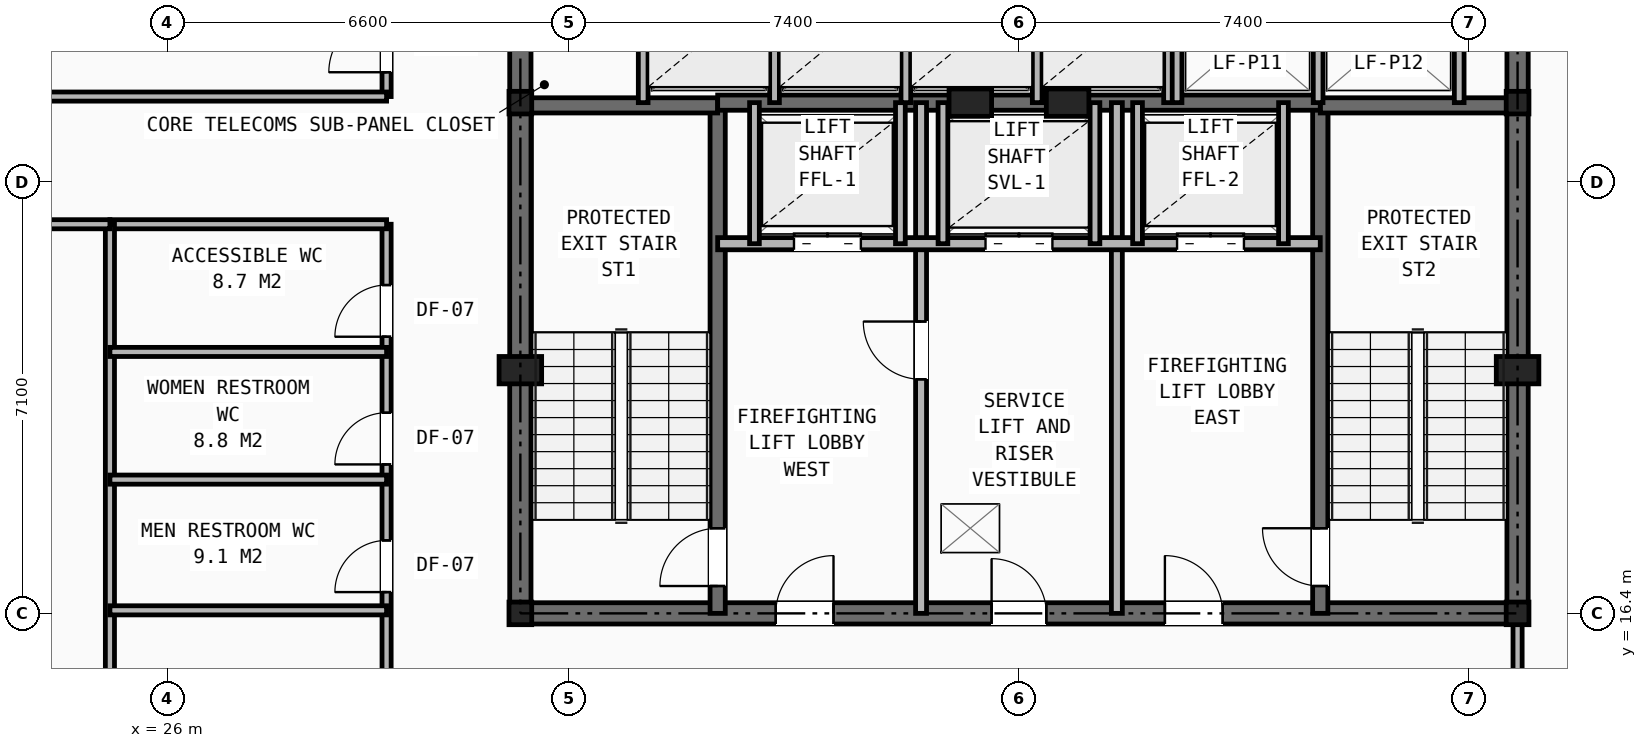
"""IFC4 building model, lengths in metres.
Left out: names, types, materials, properties, quantities, classifications, styles, units other than length and angle.
Written with IfcOpenShell. Run it as: python <this file> out.ifc"""

import sys

from ifc_helpers import new_model, si_unit, direction, frame, frame_2d, origin, origin_2d, place, context, subcontext, project, spatial, rectangle, i_section, extrude, element, fill, save


model = new_model("IFC4")
c1 = context("Model", 3, precision=1e-05, world=origin(), true_north=direction((0.0, 1.0)))
c2 = subcontext(c1, "Body", "Model", "MODEL_VIEW")
j1 = project(units=[si_unit("LENGTHUNIT", "METRE"), si_unit("PLANEANGLEUNIT", "RADIAN")], contexts=[c1])
p1 = place(None, origin())
s1 = spatial("IfcSite", under=j1, at=p1, CompositionType="ELEMENT")
p2 = place(p1, origin())
s2 = spatial("IfcBuilding", under=s1, at=p2, CompositionType="ELEMENT")
p3 = place(p2, frame((0.0, 0.0, 111.8)))
s3 = spatial("IfcBuildingStorey", under=s2, at=p3, CompositionType="ELEMENT", Elevation=111.8)
for number, where, z_axis, x_axis in (
    (1, (31.8, 16.4, 0.0), (0.0, 0.0, 1.0), (1.0, 0.0, 0.0)),
    (2, (48.2, 16.4, 0.0), (0.0, 0.0, 1.0), (1.0, 0.0, 0.0)),
    (3, (31.8, 24.8, 0.0), (0.0, 0.0, 1.0), (1.0, 0.0, 0.0)),
    (4, (48.2, 24.8, 0.0), (0.0, 0.0, 1.0), (1.0, 0.0, 0.0)),
):
    element("IfcColumn", number, at=place(p3, frame(where, z_axis=z_axis, x_axis=x_axis)), inside=s3, PredefinedType="COLUMN", context=c2, shape_type="SweptSolid", body=[
        extrude(i_section(OverallWidth=0.374, OverallDepth=0.372, WebThickness=0.016, FlangeThickness=0.026, at=origin_2d()), origin(), (0.0, 0.0, 1.0), 4.2),
    ])
for number, where, z_axis, x_axis in (
    (5, (31.8, 20.4, 0.0), (0.0, 0.0, 1.0), (1.0, 0.0, 0.0)),
    (6, (48.2, 20.4, 0.0), (0.0, 0.0, 1.0), (1.0, 0.0, 0.0)),
    (7, (39.2, 24.8, 0.0), (0.0, 0.0, 1.0), (1.0, 0.0, 0.0)),
    (8, (40.8, 24.8, 0.0), (0.0, 0.0, 1.0), (1.0, 0.0, 0.0)),
):
    element("IfcColumn", number, at=place(p3, frame(where, z_axis=z_axis, x_axis=x_axis)), inside=s3, PredefinedType="PILASTER", context=c2, shape_type="SweptSolid", body=[
        extrude(rectangle(XDim=0.7, YDim=0.45, at=origin_2d()), origin(), (0.0, 0.0, 1.0), 4.2),
    ])
p4 = place(p3, frame((31.8, 16.4, 0.0), z_axis=(0.0, 0.0, 1.0), x_axis=(1.0, 0.0, 0.0)))
e9 = element("IfcWall", 9, at=p4, inside=s3, PredefinedType="SHEAR", context=c2, shape_type="SweptSolid", body=[
    extrude(rectangle(XDim=16.4, YDim=0.35, at=frame_2d((8.2, 0.0))), origin(), (0.0, 0.0, 1.0), 3.96),
])
p5 = place(p4, frame((7.75, 0.0, 0.0)))
e10 = element("IfcOpeningElement", 10, at=p5, cuts=e9, PredefinedType="OPENING", context=c2, shape_type="SweptSolid", body=[
    extrude(rectangle(XDim=0.9, YDim=2.1, at=frame_2d((0.45, 1.05))), frame((0.0, 0.185, 0.0), z_axis=(0.0, -1.0, 0.0), x_axis=(1.0, 0.0, 0.0)), (0.0, 0.0, 1.0), 0.37),
])
p6 = place(p4, frame((4.2, 0.0, 0.0)))
e11 = element("IfcOpeningElement", 11, at=p6, cuts=e9, PredefinedType="OPENING", context=c2, shape_type="SweptSolid", body=[
    extrude(rectangle(XDim=0.95, YDim=2.1, at=frame_2d((0.475, 1.05))), frame((0.0, 0.185, 0.0), z_axis=(0.0, -1.0, 0.0), x_axis=(1.0, 0.0, 0.0)), (0.0, 0.0, 1.0), 0.37),
])
p7 = place(p4, frame((10.6, 0.0, 0.0)))
e12 = element("IfcOpeningElement", 12, at=p7, cuts=e9, PredefinedType="OPENING", context=c2, shape_type="SweptSolid", body=[
    extrude(rectangle(XDim=0.95, YDim=2.1, at=frame_2d((0.475, 1.05))), frame((0.0, 0.185, 0.0), z_axis=(0.0, -1.0, 0.0), x_axis=(1.0, 0.0, 0.0)), (0.0, 0.0, 1.0), 0.37),
])
p8 = place(p3, frame((31.8, 16.4, 0.0), z_axis=(0.0, 0.0, 1.0), x_axis=(0.0, 1.0, 0.0)))
e13 = element("IfcWall", 13, at=p8, inside=s3, PredefinedType="SHEAR", context=c2, shape_type="SweptSolid", body=[
    extrude(rectangle(XDim=14.8, YDim=0.35, at=frame_2d((7.4, 0.0))), origin(), (0.0, 0.0, 1.0), 3.96),
])
p9 = place(p8, frame((11.0, 0.0, 0.0)))
e14 = element("IfcOpeningElement", 14, at=p9, cuts=e13, PredefinedType="OPENING", context=c2, shape_type="SweptSolid", body=[
    extrude(rectangle(XDim=1.1, YDim=2.15, at=frame_2d((0.55, 1.075))), frame((0.0, 0.185, 0.0), z_axis=(0.0, -1.0, 0.0), x_axis=(1.0, 0.0, 0.0)), (0.0, 0.0, 1.0), 0.37),
])
p10 = place(p3, frame((48.2, 16.4, 0.0), z_axis=(0.0, 0.0, 1.0), x_axis=(0.0, 1.0, 0.0)))
e15 = element("IfcWall", 15, at=p10, inside=s3, PredefinedType="SHEAR", context=c2, shape_type="SweptSolid", body=[
    extrude(rectangle(XDim=14.8, YDim=0.35, at=frame_2d((7.4, 0.0))), origin(), (0.0, 0.0, 1.0), 3.96),
])
p11 = place(p10, frame((11.0, 0.0, 0.0)))
e16 = element("IfcOpeningElement", 16, at=p11, cuts=e15, PredefinedType="OPENING", context=c2, shape_type="SweptSolid", body=[
    extrude(rectangle(XDim=1.1, YDim=2.15, at=frame_2d((0.55, 1.075))), frame((0.0, 0.185, 0.0), z_axis=(0.0, -1.0, 0.0), x_axis=(1.0, 0.0, 0.0)), (0.0, 0.0, 1.0), 0.37),
])
p12 = place(p3, frame((35.045, 16.4, 0.0), z_axis=(0.0, 0.0, 1.0), x_axis=(0.0, 1.0, 0.0)))
e17 = element("IfcWall", 17, at=p12, inside=s3, PredefinedType="SHEAR", context=c2, shape_type="SweptSolid", body=[
    extrude(rectangle(XDim=8.4, YDim=0.25, at=frame_2d((4.2, 0.0))), origin(), (0.0, 0.0, 1.0), 3.96),
])
p13 = place(p12, frame((0.45, 0.0, 0.0)))
e18 = element("IfcOpeningElement", 18, at=p13, cuts=e17, PredefinedType="OPENING", context=c2, shape_type="SweptSolid", body=[
    extrude(rectangle(XDim=0.95, YDim=2.1, at=frame_2d((0.475, 1.05))), frame((0.0, 0.135, 0.0), z_axis=(0.0, -1.0, 0.0), x_axis=(1.0, 0.0, 0.0)), (0.0, 0.0, 1.0), 0.27),
])
p14 = place(p3, frame((31.8, 24.755, 0.0), z_axis=(0.0, 0.0, 1.0), x_axis=(1.0, 0.0, 0.0)))
e19 = element("IfcWall", 19, at=p14, inside=s3, PredefinedType="SHEAR", context=c2, shape_type="SweptSolid", body=[
    extrude(rectangle(XDim=3.245, YDim=0.25, at=frame_2d((1.623, 0.0))), origin(), (0.0, 0.0, 1.0), 3.96),
])
p15 = place(p3, frame((44.955, 16.4, 0.0), z_axis=(0.0, 0.0, 1.0), x_axis=(0.0, 1.0, 0.0)))
e20 = element("IfcWall", 20, at=p15, inside=s3, PredefinedType="SHEAR", context=c2, shape_type="SweptSolid", body=[
    extrude(rectangle(XDim=8.4, YDim=0.25, at=frame_2d((4.2, 0.0))), origin(), (0.0, 0.0, 1.0), 3.96),
])
p16 = place(p15, frame((0.45, 0.0, 0.0)))
e21 = element("IfcOpeningElement", 21, at=p16, cuts=e20, PredefinedType="OPENING", context=c2, shape_type="SweptSolid", body=[
    extrude(rectangle(XDim=0.95, YDim=2.1, at=frame_2d((0.475, 1.05))), frame((0.0, 0.135, 0.0), z_axis=(0.0, -1.0, 0.0), x_axis=(1.0, 0.0, 0.0)), (0.0, 0.0, 1.0), 0.27),
])
p17 = place(p3, frame((44.955, 24.755, 0.0), z_axis=(0.0, 0.0, 1.0), x_axis=(1.0, 0.0, 0.0)))
e22 = element("IfcWall", 22, at=p17, inside=s3, PredefinedType="SHEAR", context=c2, shape_type="SweptSolid", body=[
    extrude(rectangle(XDim=3.245, YDim=0.25, at=frame_2d((1.623, 0.0))), origin(), (0.0, 0.0, 1.0), 3.96),
])
p18 = place(p3, frame((35.045, 24.8, 0.0), z_axis=(0.0, 0.0, 1.0), x_axis=(1.0, 0.0, 0.0)))
e23 = element("IfcWall", 23, at=p18, inside=s3, PredefinedType="SHEAR", context=c2, shape_type="SweptSolid", body=[
    extrude(rectangle(XDim=9.91, YDim=0.25, at=frame_2d((4.955, 0.0))), origin(), (0.0, 0.0, 1.0), 3.96),
])
p19 = place(p3, frame((38.39, 16.4, 0.0), z_axis=(0.0, 0.0, 1.0), x_axis=(0.0, 1.0, 0.0)))
e24 = element("IfcWall", 24, at=p19, inside=s3, PredefinedType="PARTITIONING", context=c2, shape_type="SweptSolid", body=[
    extrude(rectangle(XDim=8.4, YDim=0.18, at=frame_2d((4.2, 0.0))), origin(), (0.0, 0.0, 1.0), 3.411),
])
p20 = place(p19, frame((3.85, 0.0, 0.0)))
e25 = element("IfcOpeningElement", 25, at=p20, cuts=e24, PredefinedType="OPENING", context=c2, shape_type="SweptSolid", body=[
    extrude(rectangle(XDim=0.95, YDim=2.1, at=frame_2d((0.475, 1.05))), frame((0.0, 0.1, 0.0), z_axis=(0.0, -1.0, 0.0), x_axis=(1.0, 0.0, 0.0)), (0.0, 0.0, 1.0), 0.2),
])
p21 = place(p3, frame((41.61, 16.4, 0.0), z_axis=(0.0, 0.0, 1.0), x_axis=(0.0, 1.0, 0.0)))
e26 = element("IfcWall", 26, at=p21, inside=s3, PredefinedType="PARTITIONING", context=c2, shape_type="SweptSolid", body=[
    extrude(rectangle(XDim=8.4, YDim=0.18, at=frame_2d((4.2, 0.0))), origin(), (0.0, 0.0, 1.0), 3.411),
])
p22 = place(p3, frame((35.045, 22.48, 0.0), z_axis=(0.0, 0.0, 1.0), x_axis=(1.0, 0.0, 0.0)))
e27 = element("IfcWall", 27, at=p22, inside=s3, PredefinedType="SOLIDWALL", context=c2, shape_type="SweptSolid", body=[
    extrude(rectangle(XDim=9.91, YDim=0.2, at=frame_2d((4.955, 0.0))), origin(), (0.0, 0.0, 1.0), 3.96),
])
p23 = place(p22, frame((1.255, 0.0, 0.0)))
e28 = element("IfcOpeningElement", 28, at=p23, cuts=e27, PredefinedType="OPENING", context=c2, shape_type="SweptSolid", body=[
    extrude(rectangle(XDim=1.1, YDim=2.15, at=frame_2d((0.55, 1.075))), frame((0.0, 0.11, 0.0), z_axis=(0.0, -1.0, 0.0), x_axis=(1.0, 0.0, 0.0)), (0.0, 0.0, 1.0), 0.22),
])
p24 = place(p22, frame((7.555, 0.0, 0.0)))
e29 = element("IfcOpeningElement", 29, at=p24, cuts=e27, PredefinedType="OPENING", context=c2, shape_type="SweptSolid", body=[
    extrude(rectangle(XDim=1.1, YDim=2.15, at=frame_2d((0.55, 1.075))), frame((0.0, 0.11, 0.0), z_axis=(0.0, -1.0, 0.0), x_axis=(1.0, 0.0, 0.0)), (0.0, 0.0, 1.0), 0.22),
])
p25 = place(p22, frame((4.405, 0.0, 0.0)))
e30 = element("IfcOpeningElement", 30, at=p25, cuts=e27, PredefinedType="OPENING", context=c2, shape_type="SweptSolid", body=[
    extrude(rectangle(XDim=1.1, YDim=2.15, at=frame_2d((0.55, 1.075))), frame((0.0, 0.11, 0.0), z_axis=(0.0, -1.0, 0.0), x_axis=(1.0, 0.0, 0.0)), (0.0, 0.0, 1.0), 0.22),
])
for number, where, z_axis, x_axis in (
    (31, (35.65, 22.48, 0.0), (0.0, 0.0, 1.0), (0.0, 1.0, 0.0)),
    (32, (38.05, 22.48, 0.0), (0.0, 0.0, 1.0), (0.0, 1.0, 0.0)),
    (33, (41.95, 22.48, 0.0), (0.0, 0.0, 1.0), (0.0, 1.0, 0.0)),
    (34, (44.35, 22.48, 0.0), (0.0, 0.0, 1.0), (0.0, 1.0, 0.0)),
    (35, (38.75, 22.48, 0.0), (0.0, 0.0, 1.0), (0.0, 1.0, 0.0)),
    (36, (41.25, 22.48, 0.0), (0.0, 0.0, 1.0), (0.0, 1.0, 0.0)),
):
    element("IfcWall", number, at=place(p3, frame(where, z_axis=z_axis, x_axis=x_axis)), inside=s3, PredefinedType="SOLIDWALL", context=c2, shape_type="SweptSolid", body=[
        extrude(rectangle(XDim=2.32, YDim=0.16, at=frame_2d((1.16, 0.0))), origin(), (0.0, 0.0, 1.0), 3.96),
    ])
for number, where, z_axis, x_axis in (
    (37, (33.82, 24.8, 0.0), (0.0, 0.0, 1.0), (0.0, 1.0, 0.0)),
    (38, (35.98, 24.8, 0.0), (0.0, 0.0, 1.0), (0.0, 1.0, 0.0)),
    (39, (38.14, 24.8, 0.0), (0.0, 0.0, 1.0), (0.0, 1.0, 0.0)),
    (40, (40.3, 24.8, 0.0), (0.0, 0.0, 1.0), (0.0, 1.0, 0.0)),
    (41, (42.46, 24.8, 0.0), (0.0, 0.0, 1.0), (0.0, 1.0, 0.0)),
    (42, (42.6, 24.8, 0.0), (0.0, 0.0, 1.0), (0.0, 1.0, 0.0)),
    (43, (44.92, 24.8, 0.0), (0.0, 0.0, 1.0), (0.0, 1.0, 0.0)),
    (44, (47.24, 24.8, 0.0), (0.0, 0.0, 1.0), (0.0, 1.0, 0.0)),
):
    element("IfcWall", number, at=place(p3, frame(where, z_axis=z_axis, x_axis=x_axis)), inside=s3, PredefinedType="SOLIDWALL", context=c2, shape_type="SweptSolid", body=[
        extrude(rectangle(XDim=2.08, YDim=0.16, at=frame_2d((1.04, 0.0))), origin(), (0.0, 0.0, 1.0), 3.96),
    ])
p26 = place(p3, frame((48.2, 14.1, 0.0), z_axis=(0.0, 0.0, 1.0), x_axis=(0.0, 1.0, 0.0)))
e45 = element("IfcWall", 45, at=p26, inside=s3, PredefinedType="PARTITIONING", context=c2, shape_type="SweptSolid", body=[
    extrude(rectangle(XDim=2.3, YDim=0.15, at=frame_2d((1.15, 0.0))), origin(), (0.0, 0.0, 1.0), 3.411),
])
p27 = place(p3, frame((29.6, 14.1, 0.0), z_axis=(0.0, 0.0, 1.0), x_axis=(0.0, 1.0, 0.0)))
e46 = element("IfcWall", 46, at=p27, inside=s3, PredefinedType="PARTITIONING", context=c2, shape_type="SweptSolid", body=[
    extrude(rectangle(XDim=8.7, YDim=0.15, at=frame_2d((4.35, 0.0))), origin(), (0.0, 0.0, 1.0), 3.96),
])
p28 = place(p27, frame((2.65, 0.0, 0.0)))
e47 = element("IfcOpeningElement", 47, at=p28, cuts=e46, PredefinedType="OPENING", context=c2, shape_type="SweptSolid", body=[
    extrude(rectangle(XDim=0.85, YDim=2.05, at=frame_2d((0.425, 1.025))), frame((0.0, 0.085, 0.0), z_axis=(0.0, -1.0, 0.0), x_axis=(1.0, 0.0, 0.0)), (0.0, 0.0, 1.0), 0.17),
])
p29 = place(p27, frame((4.75, 0.0, 0.0)))
e48 = element("IfcOpeningElement", 48, at=p29, cuts=e46, PredefinedType="OPENING", context=c2, shape_type="SweptSolid", body=[
    extrude(rectangle(XDim=0.85, YDim=2.05, at=frame_2d((0.425, 1.025))), frame((0.0, 0.085, 0.0), z_axis=(0.0, -1.0, 0.0), x_axis=(1.0, 0.0, 0.0)), (0.0, 0.0, 1.0), 0.17),
])
p30 = place(p27, frame((6.85, 0.0, 0.0)))
e49 = element("IfcOpeningElement", 49, at=p30, cuts=e46, PredefinedType="OPENING", context=c2, shape_type="SweptSolid", body=[
    extrude(rectangle(XDim=0.85, YDim=2.05, at=frame_2d((0.425, 1.025))), frame((0.0, 0.085, 0.0), z_axis=(0.0, -1.0, 0.0), x_axis=(1.0, 0.0, 0.0)), (0.0, 0.0, 1.0), 0.17),
])
p31 = place(p3, frame((29.6, 24.9, 0.0), z_axis=(0.0, 0.0, 1.0), x_axis=(0.0, 1.0, 0.0)))
e50 = element("IfcWall", 50, at=p31, inside=s3, PredefinedType="PARTITIONING", context=c2, shape_type="SweptSolid", body=[
    extrude(rectangle(XDim=13.9, YDim=0.15, at=frame_2d((6.95, 0.0))), origin(), (0.0, 0.0, 1.0), 2.975),
])
p32 = place(p31, frame((0.4, 0.0, 0.0)))
e51 = element("IfcOpeningElement", 51, at=p32, cuts=e50, PredefinedType="OPENING", context=c2, shape_type="SweptSolid", body=[
    extrude(rectangle(XDim=0.95, YDim=2.1, at=frame_2d((0.475, 1.05))), frame((0.0, 0.085, 0.0), z_axis=(0.0, -1.0, 0.0), x_axis=(1.0, 0.0, 0.0)), (0.0, 0.0, 1.0), 0.17),
])
p33 = place(p3, frame((25.05, 22.8, 0.0), z_axis=(0.0, 0.0, 1.0), x_axis=(1.0, 0.0, 0.0)))
e52 = element("IfcWall", 52, at=p33, inside=s3, PredefinedType="PARTITIONING", context=c2, shape_type="SweptSolid", body=[
    extrude(rectangle(XDim=4.55, YDim=0.15, at=frame_2d((2.275, 0.0))), origin(), (0.0, 0.0, 1.0), 3.96),
])
p34 = place(p3, frame((18.711, 24.9, 0.0), z_axis=(0.0, 0.0, 1.0), x_axis=(1.0, 0.0, 0.0)))
e53 = element("IfcWall", 53, at=p34, inside=s3, PredefinedType="PARTITIONING", context=c2, shape_type="SweptSolid", body=[
    extrude(rectangle(XDim=10.889, YDim=0.15, at=frame_2d((5.444, 0.0))), origin(), (0.0, 0.0, 1.0), 3.248),
])
p35 = place(p3, frame((25.05, 14.1, 0.0), z_axis=(0.0, 0.0, 1.0), x_axis=(0.0, 1.0, 0.0)))
e54 = element("IfcWall", 54, at=p35, inside=s3, PredefinedType="PARTITIONING", context=c2, shape_type="SweptSolid", body=[
    extrude(rectangle(XDim=8.7, YDim=0.15, at=frame_2d((4.35, 0.0))), origin(), (0.0, 0.0, 1.0), 3.96),
])
for number, where, z_axis, x_axis in (
    (55, (25.05, 16.45, 0.0), (0.0, 0.0, 1.0), (1.0, 0.0, 0.0)),
    (56, (25.05, 18.6, 0.0), (0.0, 0.0, 1.0), (1.0, 0.0, 0.0)),
    (57, (25.05, 20.7, 0.0), (0.0, 0.0, 1.0), (1.0, 0.0, 0.0)),
):
    element("IfcWall", number, at=place(p3, frame(where, z_axis=z_axis, x_axis=x_axis)), inside=s3, PredefinedType="PARTITIONING", context=c2, shape_type="SweptSolid", body=[
        extrude(rectangle(XDim=4.55, YDim=0.15, at=frame_2d((2.275, 0.0))), origin(), (0.0, 0.0, 1.0), 3.96),
    ])
p36 = place(p3, frame((20.5, 22.8, 0.0), z_axis=(0.0, 0.0, 1.0), x_axis=(1.0, 0.0, 0.0)))
e58 = element("IfcWall", 58, at=p36, inside=s3, PredefinedType="PARTITIONING", context=c2, shape_type="SweptSolid", body=[
    extrude(rectangle(XDim=4.55, YDim=0.15, at=frame_2d((2.275, 0.0))), origin(), (0.0, 0.0, 1.0), 3.96),
])
p37 = place(p36, frame((1.4, 0.0, 0.0)))
e59 = element("IfcOpeningElement", 59, at=p37, cuts=e58, PredefinedType="OPENING", context=c2, shape_type="SweptSolid", body=[
    extrude(rectangle(XDim=0.95, YDim=2.1, at=frame_2d((0.475, 1.05))), frame((0.0, 0.085, 0.0), z_axis=(0.0, -1.0, 0.0), x_axis=(1.0, 0.0, 0.0)), (0.0, 0.0, 1.0), 0.17),
])
p38 = place(p5, origin())
e60 = element("IfcDoor", 60, at=p38, inside=s3, OperationType="SINGLE_SWING_LEFT", PredefinedType="DOOR", context=c2, shape_type="SweptSolid", body=[
    extrude(rectangle(XDim=0.9, YDim=2.1, at=frame_2d((0.45, 1.05))), frame((0.0, 0.025, 0.0), z_axis=(0.0, -1.0, 0.0), x_axis=(1.0, 0.0, 0.0)), (0.0, 0.0, 1.0), 0.05),
])
fill(e10, e60)
p39 = place(p20, origin())
e61 = element("IfcDoor", 61, at=p39, inside=s3, OperationType="SINGLE_SWING_RIGHT", PredefinedType="DOOR", context=c2, shape_type="SweptSolid", body=[
    extrude(rectangle(XDim=0.95, YDim=2.1, at=frame_2d((0.475, 1.05))), frame((0.0, 0.025, 0.0), z_axis=(0.0, -1.0, 0.0), x_axis=(1.0, 0.0, 0.0)), (0.0, 0.0, 1.0), 0.05),
])
fill(e25, e61)
p40 = place(p13, origin())
e62 = element("IfcDoor", 62, at=p40, inside=s3, OperationType="SINGLE_SWING_LEFT", PredefinedType="DOOR", context=c2, shape_type="SweptSolid", body=[
    extrude(rectangle(XDim=0.95, YDim=2.1, at=frame_2d((0.475, 1.05))), frame((0.0, 0.025, 0.0), z_axis=(0.0, -1.0, 0.0), x_axis=(1.0, 0.0, 0.0)), (0.0, 0.0, 1.0), 0.05),
])
fill(e18, e62)
p41 = place(p16, origin())
e63 = element("IfcDoor", 63, at=p41, inside=s3, OperationType="SINGLE_SWING_RIGHT", PredefinedType="DOOR", context=c2, shape_type="SweptSolid", body=[
    extrude(rectangle(XDim=0.95, YDim=2.1, at=frame_2d((0.475, 1.05))), frame((0.0, 0.025, 0.0), z_axis=(0.0, -1.0, 0.0), x_axis=(1.0, 0.0, 0.0)), (0.0, 0.0, 1.0), 0.05),
])
fill(e21, e63)
p42 = place(p6, origin())
e64 = element("IfcDoor", 64, at=p42, inside=s3, OperationType="SINGLE_SWING_RIGHT", PredefinedType="DOOR", context=c2, shape_type="SweptSolid", body=[
    extrude(rectangle(XDim=0.95, YDim=2.1, at=frame_2d((0.475, 1.05))), frame((0.0, 0.025, 0.0), z_axis=(0.0, -1.0, 0.0), x_axis=(1.0, 0.0, 0.0)), (0.0, 0.0, 1.0), 0.05),
])
fill(e11, e64)
p43 = place(p7, origin())
e65 = element("IfcDoor", 65, at=p43, inside=s3, OperationType="SINGLE_SWING_LEFT", PredefinedType="DOOR", context=c2, shape_type="SweptSolid", body=[
    extrude(rectangle(XDim=0.95, YDim=2.1, at=frame_2d((0.475, 1.05))), frame((0.0, 0.025, 0.0), z_axis=(0.0, -1.0, 0.0), x_axis=(1.0, 0.0, 0.0)), (0.0, 0.0, 1.0), 0.05),
])
fill(e12, e65)
p44 = place(p23, origin())
e66 = element("IfcDoor", 66, at=p44, inside=s3, OperationType="DOUBLE_DOOR_SLIDING", PredefinedType="DOOR", context=c2, shape_type="SweptSolid", body=[
    extrude(rectangle(XDim=1.1, YDim=2.15, at=frame_2d((0.55, 1.075))), frame((0.0, 0.025, 0.0), z_axis=(0.0, -1.0, 0.0), x_axis=(1.0, 0.0, 0.0)), (0.0, 0.0, 1.0), 0.05),
])
fill(e28, e66)
p45 = place(p24, origin())
e67 = element("IfcDoor", 67, at=p45, inside=s3, OperationType="DOUBLE_DOOR_SLIDING", PredefinedType="DOOR", context=c2, shape_type="SweptSolid", body=[
    extrude(rectangle(XDim=1.1, YDim=2.15, at=frame_2d((0.55, 1.075))), frame((0.0, 0.025, 0.0), z_axis=(0.0, -1.0, 0.0), x_axis=(1.0, 0.0, 0.0)), (0.0, 0.0, 1.0), 0.05),
])
fill(e29, e67)
p46 = place(p25, origin())
e68 = element("IfcDoor", 68, at=p46, inside=s3, OperationType="DOUBLE_DOOR_SLIDING", PredefinedType="DOOR", context=c2, shape_type="SweptSolid", body=[
    extrude(rectangle(XDim=1.1, YDim=2.15, at=frame_2d((0.55, 1.075))), frame((0.0, 0.025, 0.0), z_axis=(0.0, -1.0, 0.0), x_axis=(1.0, 0.0, 0.0)), (0.0, 0.0, 1.0), 0.05),
])
fill(e30, e68)
p47 = place(p28, origin())
e69 = element("IfcDoor", 69, at=p47, inside=s3, OperationType="SINGLE_SWING_LEFT", PredefinedType="DOOR", context=c2, shape_type="SweptSolid", body=[
    extrude(rectangle(XDim=0.85, YDim=2.05, at=frame_2d((0.425, 1.025))), frame((0.0, 0.025, 0.0), z_axis=(0.0, -1.0, 0.0), x_axis=(1.0, 0.0, 0.0)), (0.0, 0.0, 1.0), 0.05),
])
fill(e47, e69)
p48 = place(p29, origin())
e70 = element("IfcDoor", 70, at=p48, inside=s3, OperationType="SINGLE_SWING_LEFT", PredefinedType="DOOR", context=c2, shape_type="SweptSolid", body=[
    extrude(rectangle(XDim=0.85, YDim=2.05, at=frame_2d((0.425, 1.025))), frame((0.0, 0.025, 0.0), z_axis=(0.0, -1.0, 0.0), x_axis=(1.0, 0.0, 0.0)), (0.0, 0.0, 1.0), 0.05),
])
fill(e48, e70)
p49 = place(p30, origin())
e71 = element("IfcDoor", 71, at=p49, inside=s3, OperationType="SINGLE_SWING_LEFT", PredefinedType="DOOR", context=c2, shape_type="SweptSolid", body=[
    extrude(rectangle(XDim=0.85, YDim=2.05, at=frame_2d((0.425, 1.025))), frame((0.0, 0.025, 0.0), z_axis=(0.0, -1.0, 0.0), x_axis=(1.0, 0.0, 0.0)), (0.0, 0.0, 1.0), 0.05),
])
fill(e49, e71)
p50 = place(p32, origin())
e72 = element("IfcDoor", 72, at=p50, inside=s3, OperationType="SINGLE_SWING_LEFT", PredefinedType="DOOR", context=c2, shape_type="SweptSolid", body=[
    extrude(rectangle(XDim=0.95, YDim=2.1, at=frame_2d((0.475, 1.05))), frame((0.0, 0.025, 0.0), z_axis=(0.0, -1.0, 0.0), x_axis=(1.0, 0.0, 0.0)), (0.0, 0.0, 1.0), 0.05),
])
fill(e51, e72)
save(model, sys.argv[1])
